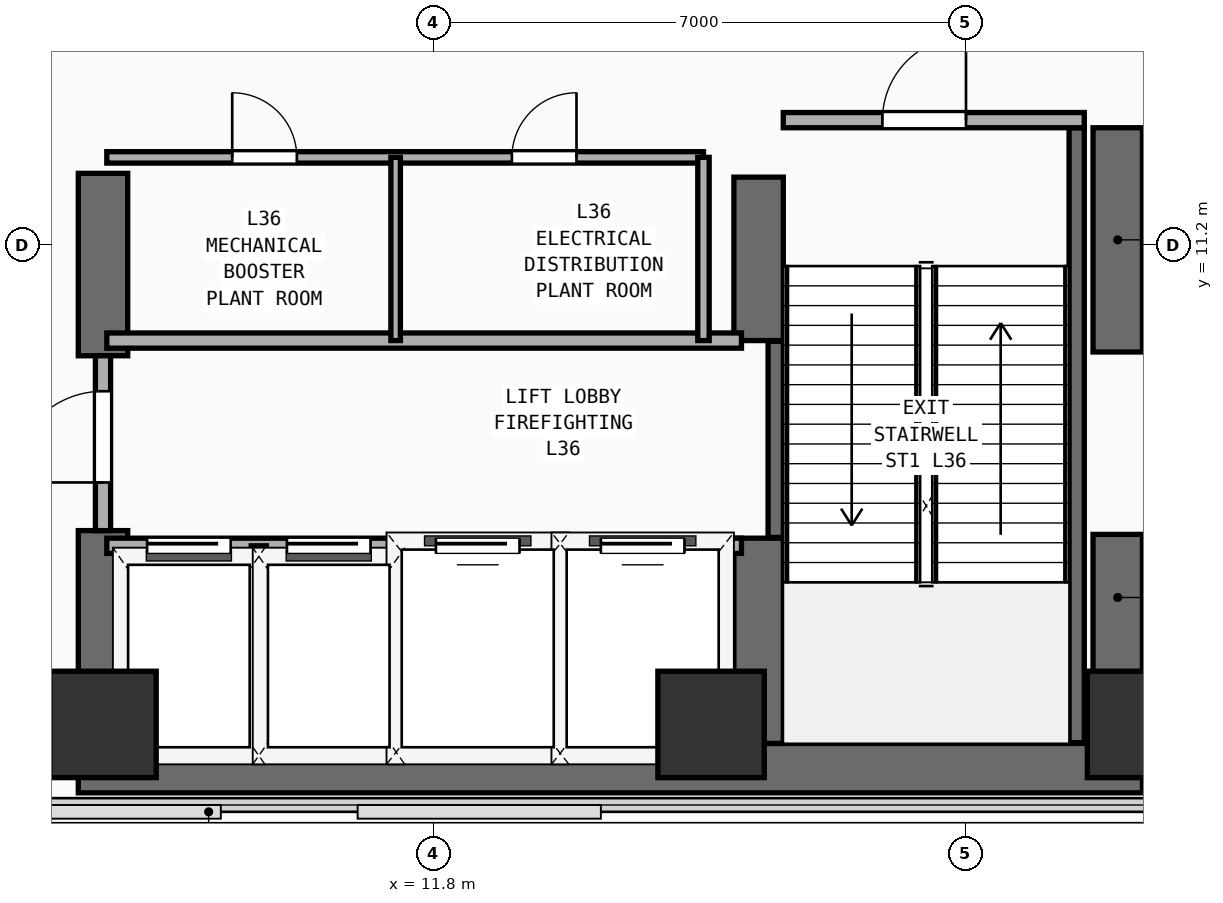
"""IFC4 building model, lengths in metres.
Left out: names, types, materials, properties, quantities, classifications, styles, units other than length and angle.
Written with IfcOpenShell. Run it as: python <this file> out.ifc"""

import sys

from ifc_helpers import new_model, si_unit, direction, frame, frame_2d, origin, origin_2d, place, context, subcontext, project, spatial, rectangle, extrude, element, fill, save


model = new_model("IFC4")
c1 = context("Model", 3, precision=1e-05, world=origin(), true_north=direction((0.0, 1.0)))
c2 = subcontext(c1, "Body", "Model", "MODEL_VIEW")
j1 = project(units=[si_unit("LENGTHUNIT", "METRE"), si_unit("PLANEANGLEUNIT", "RADIAN")], contexts=[c1])
p1 = place(None, origin())
s1 = spatial("IfcSite", under=j1, at=p1, CompositionType="ELEMENT")
p2 = place(p1, origin())
s2 = spatial("IfcBuilding", under=s1, at=p2, CompositionType="ELEMENT")
p3 = place(p2, frame((0.0, 0.0, 141.1)))
s3 = spatial("IfcBuildingStorey", under=s2, at=p3, CompositionType="ELEMENT", Elevation=141.1)
p4 = place(p3, frame((7.125, 4.325, 0.0), z_axis=(0.0, 0.0, 1.0), x_axis=(1.0, 0.0, 0.0)))
e1 = element("IfcWall", 1, at=p4, inside=s3, PredefinedType="SHEAR", context=c2, shape_type="SweptSolid", body=[
    extrude(rectangle(XDim=14.0, YDim=0.65, at=frame_2d((7.0, 0.0))), origin(), (0.0, 0.0, 1.0), 4.86),
])
p5 = place(p3, frame((7.45, 4.65, 0.0), z_axis=(0.0, 0.0, 1.0), x_axis=(0.0, 1.0, 0.0)))
e2 = element("IfcWall", 2, at=p5, inside=s3, PredefinedType="SHEAR", context=c2, shape_type="SweptSolid", body=[
    extrude(rectangle(XDim=2.8, YDim=0.65, at=frame_2d((1.4, 0.0))), origin(), (0.0, 0.0, 1.0), 4.86),
])
p6 = place(p3, frame((7.45, 9.75, 0.0), z_axis=(0.0, 0.0, 1.0), x_axis=(0.0, 1.0, 0.0)))
e3 = element("IfcWall", 3, at=p6, inside=s3, PredefinedType="SHEAR", context=c2, shape_type="SweptSolid", body=[
    extrude(rectangle(XDim=2.4, YDim=0.65, at=frame_2d((1.2, 0.0))), origin(), (0.0, 0.0, 1.0), 4.86),
])
p7 = place(p3, frame((20.8, 4.65, 0.0), z_axis=(0.0, 0.0, 1.0), x_axis=(0.0, 1.0, 0.0)))
e4 = element("IfcWall", 4, at=p7, inside=s3, PredefinedType="SHEAR", context=c2, shape_type="SweptSolid", body=[
    extrude(rectangle(XDim=2.75, YDim=0.65, at=frame_2d((1.375, 0.0))), origin(), (0.0, 0.0, 1.0), 4.86),
])
p8 = place(p3, frame((20.8, 9.8, 0.0), z_axis=(0.0, 0.0, 1.0), x_axis=(0.0, 1.0, 0.0)))
e5 = element("IfcWall", 5, at=p8, inside=s3, PredefinedType="SHEAR", context=c2, shape_type="SweptSolid", body=[
    extrude(rectangle(XDim=2.95, YDim=0.65, at=frame_2d((1.475, 0.0))), origin(), (0.0, 0.0, 1.0), 4.86),
])
p9 = place(p3, frame((16.075, 4.65, 0.0), z_axis=(0.0, 0.0, 1.0), x_axis=(0.0, 1.0, 0.0)))
e6 = element("IfcWall", 6, at=p9, inside=s3, PredefinedType="SHEAR", context=c2, shape_type="SweptSolid", body=[
    extrude(rectangle(XDim=2.7, YDim=0.65, at=frame_2d((1.35, 0.0))), origin(), (0.0, 0.0, 1.0), 4.86),
])
p10 = place(p3, frame((16.075, 9.95, 0.0), z_axis=(0.0, 0.0, 1.0), x_axis=(0.0, 1.0, 0.0)))
e7 = element("IfcWall", 7, at=p10, inside=s3, PredefinedType="SHEAR", context=c2, shape_type="SweptSolid", body=[
    extrude(rectangle(XDim=2.15, YDim=0.65, at=frame_2d((1.075, 0.0))), origin(), (0.0, 0.0, 1.0), 4.86),
])
for number, where, z_axis, x_axis in (
    (8, (7.45, 4.9, 0.0), (0.0, 0.0, 1.0), (1.0, 0.0, 0.0)),
    (9, (15.45, 4.9, 0.0), (0.0, 0.0, 1.0), (1.0, 0.0, 0.0)),
    (10, (21.1, 4.9, 0.0), (0.0, 0.0, 1.0), (1.0, 0.0, 0.0)),
):
    element("IfcColumn", number, at=place(p3, frame(where, z_axis=z_axis, x_axis=x_axis)), inside=s3, PredefinedType="COLUMN", context=c2, shape_type="SweptSolid", body=[
        extrude(rectangle(XDim=1.4, YDim=1.4, at=origin_2d()), origin(), (0.0, 0.0, 1.0), 4.86),
    ])
p11 = place(p3, frame((16.3, 7.36, 0.0), z_axis=(0.0, 0.0, 1.0), x_axis=(0.0, 1.0, 0.0)))
e11 = element("IfcWall", 11, at=p11, inside=s3, PredefinedType="SHEAR", context=c2, shape_type="SweptSolid", body=[
    extrude(rectangle(XDim=2.58, YDim=0.2, at=frame_2d((1.29, 0.0))), origin(), (0.0, 0.0, 1.0), 4.86),
])
p12 = place(p3, frame((20.26, 4.66, 0.0), z_axis=(0.0, 0.0, 1.0), x_axis=(0.0, 1.0, 0.0)))
e12 = element("IfcWall", 12, at=p12, inside=s3, PredefinedType="SHEAR", context=c2, shape_type="SweptSolid", body=[
    extrude(rectangle(XDim=8.09, YDim=0.2, at=frame_2d((4.045, 0.0))), origin(), (0.0, 0.0, 1.0), 4.86),
])
p13 = place(p3, frame((16.4, 12.85, 0.0), z_axis=(0.0, 0.0, 1.0), x_axis=(1.0, 0.0, 0.0)))
e13 = element("IfcWall", 13, at=p13, inside=s3, PredefinedType="PARTITIONING", context=c2, shape_type="SweptSolid", body=[
    extrude(rectangle(XDim=3.96, YDim=0.2, at=frame_2d((1.98, 0.0))), origin(), (0.0, 0.0, 1.0), 4.86),
])
p14 = place(p13, frame((1.304, 0.0, 0.0)))
e14 = element("IfcOpeningElement", 14, at=p14, cuts=e13, PredefinedType="OPENING", context=c2, shape_type="SweptSolid", body=[
    extrude(rectangle(XDim=1.1, YDim=2.2, at=frame_2d((0.55, 1.1))), frame((0.0, 0.11, 0.0), z_axis=(0.0, -1.0, 0.0), x_axis=(1.0, 0.0, 0.0)), (0.0, 0.0, 1.0), 0.22),
])
p15 = place(p3, frame((7.5, 7.25, 0.0), z_axis=(0.0, 0.0, 1.0), x_axis=(1.0, 0.0, 0.0)))
e15 = element("IfcWall", 15, at=p15, inside=s3, PredefinedType="PARTITIONING", context=c2, shape_type="SweptSolid", body=[
    extrude(rectangle(XDim=8.35, YDim=0.2, at=frame_2d((4.175, 0.0))), origin(), (0.0, 0.0, 1.0), 4.86),
])
p16 = place(p15, frame((0.53, 0.0, 0.0)))
e16 = element("IfcOpeningElement", 16, at=p16, cuts=e15, PredefinedType="OPENING", context=c2, shape_type="SweptSolid", body=[
    extrude(rectangle(XDim=1.1, YDim=2.2, at=frame_2d((0.55, 1.1))), frame((0.0, 0.11, 0.0), z_axis=(0.0, -1.0, 0.0), x_axis=(1.0, 0.0, 0.0)), (0.0, 0.0, 1.0), 0.22),
])
p17 = place(p15, frame((2.37, 0.0, 0.0)))
e17 = element("IfcOpeningElement", 17, at=p17, cuts=e15, PredefinedType="OPENING", context=c2, shape_type="SweptSolid", body=[
    extrude(rectangle(XDim=1.1, YDim=2.2, at=frame_2d((0.55, 1.1))), frame((0.0, 0.11, 0.0), z_axis=(0.0, -1.0, 0.0), x_axis=(1.0, 0.0, 0.0)), (0.0, 0.0, 1.0), 0.22),
])
p18 = place(p15, frame((4.33, 0.0, 0.0)))
e18 = element("IfcOpeningElement", 18, at=p18, cuts=e15, PredefinedType="OPENING", context=c2, shape_type="SweptSolid", body=[
    extrude(rectangle(XDim=1.1, YDim=2.2, at=frame_2d((0.55, 1.1))), frame((0.0, 0.11, 0.0), z_axis=(0.0, -1.0, 0.0), x_axis=(1.0, 0.0, 0.0)), (0.0, 0.0, 1.0), 0.22),
])
p19 = place(p15, frame((6.5, 0.0, 0.0)))
e19 = element("IfcOpeningElement", 19, at=p19, cuts=e15, PredefinedType="OPENING", context=c2, shape_type="SweptSolid", body=[
    extrude(rectangle(XDim=1.1, YDim=2.2, at=frame_2d((0.55, 1.1))), frame((0.0, 0.11, 0.0), z_axis=(0.0, -1.0, 0.0), x_axis=(1.0, 0.0, 0.0)), (0.0, 0.0, 1.0), 0.22),
])
p20 = place(p3, frame((7.5, 9.95, 0.0), z_axis=(0.0, 0.0, 1.0), x_axis=(1.0, 0.0, 0.0)))
e20 = element("IfcWall", 20, at=p20, inside=s3, PredefinedType="PARTITIONING", context=c2, shape_type="SweptSolid", body=[
    extrude(rectangle(XDim=8.35, YDim=0.2, at=frame_2d((4.175, 0.0))), origin(), (0.0, 0.0, 1.0), 4.86),
])
for number, where, z_axis, x_axis in (
    (21, (9.5, 4.45, 0.0), (0.0, 0.0, 1.0), (0.0, 1.0, 0.0)),
    (22, (11.36, 4.45, 0.0), (0.0, 0.0, 1.0), (0.0, 1.0, 0.0)),
    (23, (13.46, 4.45, 0.0), (0.0, 0.0, 1.0), (0.0, 1.0, 0.0)),
):
    element("IfcWall", number, at=place(p3, frame(where, z_axis=z_axis, x_axis=x_axis)), inside=s3, PredefinedType="PARTITIONING", context=c2, shape_type="SweptSolid", body=[
        extrude(rectangle(XDim=2.8, YDim=0.2, at=frame_2d((1.4, 0.0))), origin(), (0.0, 0.0, 1.0), 4.86),
    ])
p21 = place(p3, frame((7.45, 7.45, 0.0), z_axis=(0.0, 0.0, 1.0), x_axis=(0.0, 1.0, 0.0)))
e24 = element("IfcWall", 24, at=p21, inside=s3, PredefinedType="PARTITIONING", context=c2, shape_type="SweptSolid", body=[
    extrude(rectangle(XDim=2.3, YDim=0.2, at=frame_2d((1.15, 0.0))), origin(), (0.0, 0.0, 1.0), 3.64),
])
p22 = place(p21, frame((0.633, 0.0, 0.0)))
e25 = element("IfcOpeningElement", 25, at=p22, cuts=e24, PredefinedType="OPENING", context=c2, shape_type="SweptSolid", body=[
    extrude(rectangle(XDim=1.2, YDim=2.25, at=frame_2d((0.6, 1.125))), frame((0.0, 0.11, 0.0), z_axis=(0.0, -1.0, 0.0), x_axis=(1.0, 0.0, 0.0)), (0.0, 0.0, 1.0), 0.22),
])
p23 = place(p3, frame((7.5, 12.36, 0.0), z_axis=(0.0, 0.0, 1.0), x_axis=(1.0, 0.0, 0.0)))
e26 = element("IfcWall", 26, at=p23, inside=s3, PredefinedType="PARTITIONING", context=c2, shape_type="SweptSolid", body=[
    extrude(rectangle(XDim=7.85, YDim=0.15, at=frame_2d((3.925, 0.0))), origin(), (0.0, 0.0, 1.0), 4.86),
])
p24 = place(p23, frame((1.65, 0.0, 0.0)))
e27 = element("IfcOpeningElement", 27, at=p24, cuts=e26, PredefinedType="OPENING", context=c2, shape_type="SweptSolid", body=[
    extrude(rectangle(XDim=0.85, YDim=2.15, at=frame_2d((0.425, 1.075))), frame((0.0, 0.085, 0.0), z_axis=(0.0, -1.0, 0.0), x_axis=(1.0, 0.0, 0.0)), (0.0, 0.0, 1.0), 0.17),
])
p25 = place(p23, frame((5.329, 0.0, 0.0)))
e28 = element("IfcOpeningElement", 28, at=p25, cuts=e26, PredefinedType="OPENING", context=c2, shape_type="SweptSolid", body=[
    extrude(rectangle(XDim=0.85, YDim=2.15, at=frame_2d((0.425, 1.075))), frame((0.0, 0.085, 0.0), z_axis=(0.0, -1.0, 0.0), x_axis=(1.0, 0.0, 0.0)), (0.0, 0.0, 1.0), 0.17),
])
p26 = place(p3, frame((15.35, 9.95, 0.0), z_axis=(0.0, 0.0, 1.0), x_axis=(0.0, 1.0, 0.0)))
e29 = element("IfcWall", 29, at=p26, inside=s3, PredefinedType="PARTITIONING", context=c2, shape_type="SweptSolid", body=[
    extrude(rectangle(XDim=2.41, YDim=0.15, at=frame_2d((1.205, 0.0))), origin(), (0.0, 0.0, 1.0), 4.86),
])
p27 = place(p3, frame((11.3, 9.95, 0.0), z_axis=(0.0, 0.0, 1.0), x_axis=(0.0, 1.0, 0.0)))
e30 = element("IfcWall", 30, at=p27, inside=s3, PredefinedType="PARTITIONING", context=c2, shape_type="SweptSolid", body=[
    extrude(rectangle(XDim=2.41, YDim=0.125, at=frame_2d((1.205, 0.0))), origin(), (0.0, 0.0, 1.0), 4.86),
])
p28 = place(p14, frame((1.1, 0.0, 0.0), z_axis=(0.0, 0.0, 1.0), x_axis=(-1.0, 0.0, 0.0)))
e31 = element("IfcDoor", 31, at=p28, inside=s3, OperationType="SINGLE_SWING_LEFT", PredefinedType="DOOR", context=c2, shape_type="SweptSolid", body=[
    extrude(rectangle(XDim=1.1, YDim=2.2, at=frame_2d((0.55, 1.1))), frame((0.0, 0.025, 0.0), z_axis=(0.0, -1.0, 0.0), x_axis=(1.0, 0.0, 0.0)), (0.0, 0.0, 1.0), 0.05),
])
fill(e14, e31)
p29 = place(p16, origin())
e32 = element("IfcDoor", 32, at=p29, inside=s3, OperationType="SLIDING_TO_LEFT", PredefinedType="DOOR", context=c2, shape_type="SweptSolid", body=[
    extrude(rectangle(XDim=1.1, YDim=2.2, at=frame_2d((0.55, 1.1))), frame((0.0, 0.025, 0.0), z_axis=(0.0, -1.0, 0.0), x_axis=(1.0, 0.0, 0.0)), (0.0, 0.0, 1.0), 0.05),
])
fill(e16, e32)
p30 = place(p17, origin())
e33 = element("IfcDoor", 33, at=p30, inside=s3, OperationType="SLIDING_TO_LEFT", PredefinedType="DOOR", context=c2, shape_type="SweptSolid", body=[
    extrude(rectangle(XDim=1.1, YDim=2.2, at=frame_2d((0.55, 1.1))), frame((0.0, 0.025, 0.0), z_axis=(0.0, -1.0, 0.0), x_axis=(1.0, 0.0, 0.0)), (0.0, 0.0, 1.0), 0.05),
])
fill(e17, e33)
p31 = place(p18, origin())
e34 = element("IfcDoor", 34, at=p31, inside=s3, OperationType="SLIDING_TO_LEFT", PredefinedType="DOOR", context=c2, shape_type="SweptSolid", body=[
    extrude(rectangle(XDim=1.1, YDim=2.2, at=frame_2d((0.55, 1.1))), frame((0.0, 0.025, 0.0), z_axis=(0.0, -1.0, 0.0), x_axis=(1.0, 0.0, 0.0)), (0.0, 0.0, 1.0), 0.05),
])
fill(e18, e34)
p32 = place(p19, origin())
e35 = element("IfcDoor", 35, at=p32, inside=s3, OperationType="SLIDING_TO_LEFT", PredefinedType="DOOR", context=c2, shape_type="SweptSolid", body=[
    extrude(rectangle(XDim=1.1, YDim=2.2, at=frame_2d((0.55, 1.1))), frame((0.0, 0.025, 0.0), z_axis=(0.0, -1.0, 0.0), x_axis=(1.0, 0.0, 0.0)), (0.0, 0.0, 1.0), 0.05),
])
fill(e19, e35)
p33 = place(p22, frame((1.2, 0.0, 0.0), z_axis=(0.0, 0.0, 1.0), x_axis=(-1.0, 0.0, 0.0)))
e36 = element("IfcDoor", 36, at=p33, inside=s3, OperationType="SINGLE_SWING_RIGHT", PredefinedType="DOOR", context=c2, shape_type="SweptSolid", body=[
    extrude(rectangle(XDim=1.2, YDim=2.25, at=frame_2d((0.6, 1.125))), frame((0.0, 0.025, 0.0), z_axis=(0.0, -1.0, 0.0), x_axis=(1.0, 0.0, 0.0)), (0.0, 0.0, 1.0), 0.05),
])
fill(e25, e36)
p34 = place(p24, origin())
e37 = element("IfcDoor", 37, at=p34, inside=s3, OperationType="SINGLE_SWING_LEFT", PredefinedType="DOOR", context=c2, shape_type="SweptSolid", body=[
    extrude(rectangle(XDim=0.85, YDim=2.15, at=frame_2d((0.425, 1.075))), frame((0.0, 0.025, 0.0), z_axis=(0.0, -1.0, 0.0), x_axis=(1.0, 0.0, 0.0)), (0.0, 0.0, 1.0), 0.05),
])
fill(e27, e37)
p35 = place(p25, origin())
e38 = element("IfcDoor", 38, at=p35, inside=s3, OperationType="SINGLE_SWING_RIGHT", PredefinedType="DOOR", context=c2, shape_type="SweptSolid", body=[
    extrude(rectangle(XDim=0.85, YDim=2.15, at=frame_2d((0.425, 1.075))), frame((0.0, 0.025, 0.0), z_axis=(0.0, -1.0, 0.0), x_axis=(1.0, 0.0, 0.0)), (0.0, 0.0, 1.0), 0.05),
])
fill(e28, e38)
save(model, sys.argv[1])
